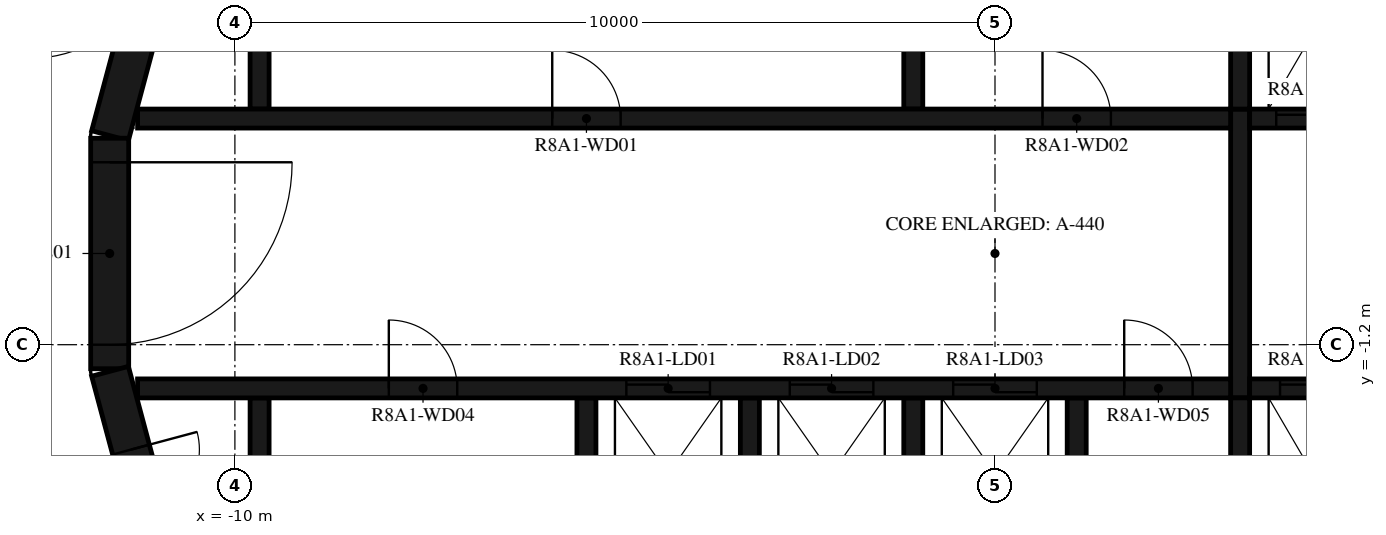
"""IFC4 building model, lengths in metres.
Left out: names, types, materials, properties, quantities, classifications, styles, units other than length and angle.
Written with IfcOpenShell. Run it as: python <this file> out.ifc"""

import sys

from ifc_helpers import new_model, si_unit, direction, frame, frame_2d, origin, place, context, subcontext, project, spatial, polyline, rectangle, outline, extrude, element, fill, save


model = new_model("IFC4")
c1 = context("Model", 3, precision=1e-05, world=origin(), true_north=direction((0.0, 1.0)))
c2 = subcontext(c1, "Body", "Model", "MODEL_VIEW")
j1 = project(units=[si_unit("LENGTHUNIT", "METRE"), si_unit("PLANEANGLEUNIT", "RADIAN")], contexts=[c1])
p1 = place(None, origin())
s1 = spatial("IfcSite", under=j1, at=p1, CompositionType="ELEMENT")
p2 = place(p1, origin())
s2 = spatial("IfcBuilding", under=s1, at=p2, CompositionType="ELEMENT")
p3 = place(p2, frame((0.0, 0.0, 301.7)))
s3 = spatial("IfcBuildingStorey", under=s2, at=p3, CompositionType="ELEMENT", Elevation=301.7)
p4 = place(p3, frame((-10.858, 4.479, 0.0), z_axis=(0.0, 0.0, 1.0), x_axis=(-0.258734743916, -0.965948410781, 0.0)))
e1 = element("IfcWall", 1, at=p4, inside=s3, PredefinedType="SHEAR", context=c2, shape_type="SweptSolid", body=[
    extrude(rectangle(XDim=3.033, YDim=0.5, at=frame_2d((1.516, 0.0))), origin(), (0.0, 0.0, 1.0), 3.12),
])
p5 = place(p3, frame((-11.647, 1.516, 0.0), z_axis=(0.0, 0.0, 1.0), x_axis=(0.0, -1.0, 0.0)))
e2 = element("IfcWall", 2, at=p5, inside=s3, PredefinedType="SHEAR", context=c2, shape_type="SweptSolid", body=[
    extrude(rectangle(XDim=3.033, YDim=0.5, at=frame_2d((1.516, 0.0))), origin(), (0.0, 0.0, 1.0), 3.12),
])
p6 = place(p5, frame((0.316, 0.0, 0.0)))
e3 = element("IfcOpeningElement", 3, at=p6, cuts=e2, PredefinedType="OPENING", context=c2, shape_type="SweptSolid", body=[
    extrude(rectangle(XDim=2.4, YDim=2.1, at=frame_2d((1.2, 1.05))), frame((0.0, 0.26, 0.0), z_axis=(0.0, -1.0, 0.0), x_axis=(1.0, 0.0, 0.0)), (0.0, 0.0, 1.0), 0.52),
])
p7 = place(p3, frame((-11.643, -1.55, 0.0), z_axis=(0.0, 0.0, 1.0), x_axis=(0.258734743916, -0.965948410781, 0.0)))
e4 = element("IfcWall", 4, at=p7, inside=s3, PredefinedType="SHEAR", context=c2, shape_type="SweptSolid", body=[
    extrude(rectangle(XDim=3.033, YDim=0.5, at=frame_2d((1.516, 0.0))), origin(), (0.0, 0.0, 1.0), 3.12),
])
p8 = place(p7, frame((1.066, 0.0, 0.0)))
e5 = element("IfcOpeningElement", 5, at=p8, cuts=e4, PredefinedType="OPENING", context=c2, shape_type="SweptSolid", body=[
    extrude(rectangle(XDim=0.9, YDim=2.1, at=frame_2d((0.45, 1.05))), frame((0.0, 0.26, 0.0), z_axis=(0.0, -1.0, 0.0), x_axis=(1.0, 0.0, 0.0)), (0.0, 0.0, 1.0), 0.52),
])
p9 = place(p3, origin())
e6 = element("IfcWall", 6, at=p9, inside=s3, PredefinedType="SHEAR", context=c2, shape_type="SweptSolid", body=[
    extrude(outline(polyline([(-9.8, 1.9), (-9.55, 1.9), (-9.55, 4.8), (-1.2, 4.8), (-1.2, 1.9), (-0.95, 1.9), (-0.95, 4.8), (3.1, 4.8), (3.1, 1.9), (3.35, 1.9), (3.35, 4.8), (5.25, 4.8), (5.25, 1.9), (5.5, 1.9), (5.5, 4.8), (7.4, 4.8), (7.4, 1.9), (7.65, 1.9), (7.65, 4.8), (9.55, 4.8), (9.55, 1.9), (9.8, 1.9), (9.8, 4.8), (9.8, 5.05), (-9.8, 5.05), (-9.8, 4.8), (-9.8, 1.9)])), origin(), (0.0, 0.0, 1.0), 3.12),
])
p10 = place(p3, origin())
e7 = element("IfcWall", 7, at=p10, inside=s3, PredefinedType="SHEAR", context=c2, shape_type="SweptSolid", body=[
    extrude(outline(polyline([(9.8, -5.05), (9.8, -4.8), (9.8, -1.9), (9.55, -1.9), (9.55, -4.8), (7.65, -4.8), (7.65, -1.9), (7.4, -1.9), (7.4, -4.8), (5.5, -4.8), (5.5, -1.9), (5.25, -1.9), (5.25, -4.8), (3.35, -4.8), (3.35, -1.9), (3.1, -1.9), (3.1, -4.8), (1.2, -4.8), (1.2, -1.9), (0.95, -1.9), (0.95, -4.8), (-0.95, -4.8), (-0.95, -1.9), (-1.2, -1.9), (-1.2, -4.8), (-3.1, -4.8), (-3.1, -1.9), (-3.35, -1.9), (-3.35, -4.8), (-5.25, -4.8), (-5.25, -1.9), (-5.5, -1.9), (-5.5, -4.8), (-9.55, -4.8), (-9.55, -1.9), (-9.8, -1.9), (-9.8, -4.8), (-9.8, -5.05), (9.8, -5.05)])), origin(), (0.0, 0.0, 1.0), 3.12),
])
p11 = place(p3, frame((-11.28, 1.775, 0.0), z_axis=(0.0, 0.0, 1.0), x_axis=(1.0, 0.0, 0.0)))
e8 = element("IfcWall", 8, at=p11, inside=s3, PredefinedType="SHEAR", context=c2, shape_type="SweptSolid", body=[
    extrude(rectangle(XDim=14.38, YDim=0.25, at=frame_2d((7.19, 0.0))), origin(), (0.0, 0.0, 1.0), 3.12),
])
p12 = place(p11, frame((5.455, 0.0, 0.0)))
e9 = element("IfcOpeningElement", 9, at=p12, cuts=e8, PredefinedType="OPENING", context=c2, shape_type="SweptSolid", body=[
    extrude(rectangle(XDim=0.9, YDim=2.1, at=frame_2d((0.45, 1.05))), frame((0.0, 0.135, 0.0), z_axis=(0.0, -1.0, 0.0), x_axis=(1.0, 0.0, 0.0)), (0.0, 0.0, 1.0), 0.27),
])
p13 = place(p11, frame((11.905, 0.0, 0.0)))
e10 = element("IfcOpeningElement", 10, at=p13, cuts=e8, PredefinedType="OPENING", context=c2, shape_type="SweptSolid", body=[
    extrude(rectangle(XDim=0.9, YDim=2.1, at=frame_2d((0.45, 1.05))), frame((0.0, 0.135, 0.0), z_axis=(0.0, -1.0, 0.0), x_axis=(1.0, 0.0, 0.0)), (0.0, 0.0, 1.0), 0.27),
])
p14 = place(p3, frame((3.35, 1.775, 0.0), z_axis=(0.0, 0.0, 1.0), x_axis=(1.0, 0.0, 0.0)))
e11 = element("IfcWall", 11, at=p14, inside=s3, PredefinedType="SHEAR", context=c2, shape_type="SweptSolid", body=[
    extrude(rectangle(XDim=7.93, YDim=0.25, at=frame_2d((3.965, 0.0))), origin(), (0.0, 0.0, 1.0), 3.12),
])
p15 = place(p14, frame((0.35, 0.0, 0.0)))
e12 = element("IfcOpeningElement", 12, at=p15, cuts=e11, PredefinedType="OPENING", context=c2, shape_type="SweptSolid", body=[
    extrude(rectangle(XDim=1.2, YDim=2.4, at=frame_2d((0.6, 1.2))), frame((0.0, 0.135, 0.0), z_axis=(0.0, -1.0, 0.0), x_axis=(1.0, 0.0, 0.0)), (0.0, 0.0, 1.0), 0.27),
])
p16 = place(p14, frame((2.5, 0.0, 0.0)))
e13 = element("IfcOpeningElement", 13, at=p16, cuts=e11, PredefinedType="OPENING", context=c2, shape_type="SweptSolid", body=[
    extrude(rectangle(XDim=1.2, YDim=2.4, at=frame_2d((0.6, 1.2))), frame((0.0, 0.135, 0.0), z_axis=(0.0, -1.0, 0.0), x_axis=(1.0, 0.0, 0.0)), (0.0, 0.0, 1.0), 0.27),
])
p17 = place(p14, frame((4.8, 0.0, 0.0)))
e14 = element("IfcOpeningElement", 14, at=p17, cuts=e11, PredefinedType="OPENING", context=c2, shape_type="SweptSolid", body=[
    extrude(rectangle(XDim=0.9, YDim=2.1, at=frame_2d((0.45, 1.05))), frame((0.0, 0.135, 0.0), z_axis=(0.0, -1.0, 0.0), x_axis=(1.0, 0.0, 0.0)), (0.0, 0.0, 1.0), 0.27),
])
p18 = place(p3, frame((-11.28, -1.775, 0.0), z_axis=(0.0, 0.0, 1.0), x_axis=(1.0, 0.0, 0.0)))
e15 = element("IfcWall", 15, at=p18, inside=s3, PredefinedType="SHEAR", context=c2, shape_type="SweptSolid", body=[
    extrude(rectangle(XDim=14.38, YDim=0.25, at=frame_2d((7.19, 0.0))), origin(), (0.0, 0.0, 1.0), 3.12),
])
p19 = place(p18, frame((6.43, 0.0, 0.0)))
e16 = element("IfcOpeningElement", 16, at=p19, cuts=e15, PredefinedType="OPENING", context=c2, shape_type="SweptSolid", body=[
    extrude(rectangle(XDim=1.1, YDim=2.1, at=frame_2d((0.55, 1.05))), frame((0.0, 0.135, 0.0), z_axis=(0.0, -1.0, 0.0), x_axis=(1.0, 0.0, 0.0)), (0.0, 0.0, 1.0), 0.27),
])
p20 = place(p18, frame((8.58, 0.0, 0.0)))
e17 = element("IfcOpeningElement", 17, at=p20, cuts=e15, PredefinedType="OPENING", context=c2, shape_type="SweptSolid", body=[
    extrude(rectangle(XDim=1.1, YDim=2.1, at=frame_2d((0.55, 1.05))), frame((0.0, 0.135, 0.0), z_axis=(0.0, -1.0, 0.0), x_axis=(1.0, 0.0, 0.0)), (0.0, 0.0, 1.0), 0.27),
])
p21 = place(p18, frame((10.73, 0.0, 0.0)))
e18 = element("IfcOpeningElement", 18, at=p21, cuts=e15, PredefinedType="OPENING", context=c2, shape_type="SweptSolid", body=[
    extrude(rectangle(XDim=1.1, YDim=2.1, at=frame_2d((0.55, 1.05))), frame((0.0, 0.135, 0.0), z_axis=(0.0, -1.0, 0.0), x_axis=(1.0, 0.0, 0.0)), (0.0, 0.0, 1.0), 0.27),
])
p22 = place(p18, frame((3.305, 0.0, 0.0)))
e19 = element("IfcOpeningElement", 19, at=p22, cuts=e15, PredefinedType="OPENING", context=c2, shape_type="SweptSolid", body=[
    extrude(rectangle(XDim=0.9, YDim=2.1, at=frame_2d((0.45, 1.05))), frame((0.0, 0.135, 0.0), z_axis=(0.0, -1.0, 0.0), x_axis=(1.0, 0.0, 0.0)), (0.0, 0.0, 1.0), 0.27),
])
p23 = place(p18, frame((12.98, 0.0, 0.0)))
e20 = element("IfcOpeningElement", 20, at=p23, cuts=e15, PredefinedType="OPENING", context=c2, shape_type="SweptSolid", body=[
    extrude(rectangle(XDim=0.9, YDim=2.1, at=frame_2d((0.45, 1.05))), frame((0.0, 0.135, 0.0), z_axis=(0.0, -1.0, 0.0), x_axis=(1.0, 0.0, 0.0)), (0.0, 0.0, 1.0), 0.27),
])
p24 = place(p3, frame((3.35, -1.775, 0.0), z_axis=(0.0, 0.0, 1.0), x_axis=(1.0, 0.0, 0.0)))
e21 = element("IfcWall", 21, at=p24, inside=s3, PredefinedType="SHEAR", context=c2, shape_type="SweptSolid", body=[
    extrude(rectangle(XDim=7.93, YDim=0.25, at=frame_2d((3.965, 0.0))), origin(), (0.0, 0.0, 1.0), 3.12),
])
p25 = place(p24, frame((0.4, 0.0, 0.0)))
e22 = element("IfcOpeningElement", 22, at=p25, cuts=e21, PredefinedType="OPENING", context=c2, shape_type="SweptSolid", body=[
    extrude(rectangle(XDim=1.1, YDim=2.4, at=frame_2d((0.55, 1.2))), frame((0.0, 0.135, 0.0), z_axis=(0.0, -1.0, 0.0), x_axis=(1.0, 0.0, 0.0)), (0.0, 0.0, 1.0), 0.27),
])
p26 = place(p24, frame((2.55, 0.0, 0.0)))
e23 = element("IfcOpeningElement", 23, at=p26, cuts=e21, PredefinedType="OPENING", context=c2, shape_type="SweptSolid", body=[
    extrude(rectangle(XDim=1.1, YDim=2.4, at=frame_2d((0.55, 1.2))), frame((0.0, 0.135, 0.0), z_axis=(0.0, -1.0, 0.0), x_axis=(1.0, 0.0, 0.0)), (0.0, 0.0, 1.0), 0.27),
])
p27 = place(p24, frame((4.7, 0.0, 0.0)))
e24 = element("IfcOpeningElement", 24, at=p27, cuts=e21, PredefinedType="OPENING", context=c2, shape_type="SweptSolid", body=[
    extrude(rectangle(XDim=1.1, YDim=2.4, at=frame_2d((0.55, 1.2))), frame((0.0, 0.135, 0.0), z_axis=(0.0, -1.0, 0.0), x_axis=(1.0, 0.0, 0.0)), (0.0, 0.0, 1.0), 0.27),
])
p28 = place(p3, frame((3.225, -1.9, 0.0), z_axis=(0.0, 0.0, 1.0), x_axis=(0.0, 1.0, 0.0)))
e25 = element("IfcWall", 25, at=p28, inside=s3, PredefinedType="SHEAR", context=c2, shape_type="SweptSolid", body=[
    extrude(rectangle(XDim=3.8, YDim=0.25, at=frame_2d((1.9, 0.0))), origin(), (0.0, 0.0, 1.0), 3.12),
])
p29 = place(p3, frame((-12.074, 6.831, 0.0), z_axis=(0.0, 0.0, 1.0), x_axis=(-0.250391063186, -0.968144780225, 0.0)))
e26 = element("IfcWall", 26, at=p29, inside=s3, PredefinedType="STANDARD", context=c2, shape_type="SweptSolid", body=[
    extrude(rectangle(XDim=7.181, YDim=0.2, at=frame_2d((3.591, 0.0))), origin(), (0.0, 0.0, 1.0), 3.12),
])
p30 = place(p29, frame((2.548, 0.0, 0.0)))
e27 = element("IfcOpeningElement", 27, at=p30, cuts=e26, PredefinedType="OPENING", context=c2, shape_type="SweptSolid", body=[
    extrude(rectangle(XDim=1.8, YDim=2.1, at=frame_2d((0.9, 1.05))), frame((0.0, 0.11, 0.0), z_axis=(0.0, -1.0, 0.0), x_axis=(1.0, 0.0, 0.0)), (0.0, 0.0, 1.0), 0.22),
])
p31 = place(p3, frame((-13.872, -0.121, 0.0), z_axis=(0.0, 0.0, 1.0), x_axis=(0.267254575108, -0.963625960674, 0.0)))
e28 = element("IfcWall", 28, at=p31, inside=s3, PredefinedType="STANDARD", context=c2, shape_type="SweptSolid", body=[
    extrude(rectangle(XDim=7.181, YDim=0.2, at=frame_2d((3.591, 0.0))), origin(), (0.0, 0.0, 1.0), 3.12),
])
p32 = place(p6, origin())
e29 = element("IfcDoor", 29, at=p32, inside=s3, OperationType="DOUBLE_DOOR_SINGLE_SWING", PredefinedType="DOOR", context=c2, shape_type="SweptSolid", body=[
    extrude(rectangle(XDim=2.4, YDim=2.1, at=frame_2d((1.2, 1.05))), frame((0.0, 0.025, 0.0), z_axis=(0.0, -1.0, 0.0), x_axis=(1.0, 0.0, 0.0)), (0.0, 0.0, 1.0), 0.05),
])
fill(e3, e29)
p33 = place(p15, origin())
e30 = element("IfcDoor", 30, at=p33, inside=s3, OperationType="DOUBLE_DOOR_SLIDING", PredefinedType="DOOR", context=c2, shape_type="SweptSolid", body=[
    extrude(rectangle(XDim=1.2, YDim=2.4, at=frame_2d((0.6, 1.2))), frame((0.0, 0.025, 0.0), z_axis=(0.0, -1.0, 0.0), x_axis=(1.0, 0.0, 0.0)), (0.0, 0.0, 1.0), 0.05),
])
fill(e12, e30)
p34 = place(p19, origin())
e31 = element("IfcDoor", 31, at=p34, inside=s3, OperationType="DOUBLE_DOOR_SLIDING", PredefinedType="DOOR", context=c2, shape_type="SweptSolid", body=[
    extrude(rectangle(XDim=1.1, YDim=2.1, at=frame_2d((0.55, 1.05))), frame((0.0, 0.025, 0.0), z_axis=(0.0, -1.0, 0.0), x_axis=(1.0, 0.0, 0.0)), (0.0, 0.0, 1.0), 0.05),
])
fill(e16, e31)
p35 = place(p20, origin())
e32 = element("IfcDoor", 32, at=p35, inside=s3, OperationType="DOUBLE_DOOR_SLIDING", PredefinedType="DOOR", context=c2, shape_type="SweptSolid", body=[
    extrude(rectangle(XDim=1.1, YDim=2.1, at=frame_2d((0.55, 1.05))), frame((0.0, 0.025, 0.0), z_axis=(0.0, -1.0, 0.0), x_axis=(1.0, 0.0, 0.0)), (0.0, 0.0, 1.0), 0.05),
])
fill(e17, e32)
p36 = place(p21, origin())
e33 = element("IfcDoor", 33, at=p36, inside=s3, OperationType="DOUBLE_DOOR_SLIDING", PredefinedType="DOOR", context=c2, shape_type="SweptSolid", body=[
    extrude(rectangle(XDim=1.1, YDim=2.1, at=frame_2d((0.55, 1.05))), frame((0.0, 0.025, 0.0), z_axis=(0.0, -1.0, 0.0), x_axis=(1.0, 0.0, 0.0)), (0.0, 0.0, 1.0), 0.05),
])
fill(e18, e33)
p37 = place(p25, origin())
e34 = element("IfcDoor", 34, at=p37, inside=s3, OperationType="DOUBLE_DOOR_SLIDING", PredefinedType="DOOR", context=c2, shape_type="SweptSolid", body=[
    extrude(rectangle(XDim=1.1, YDim=2.4, at=frame_2d((0.55, 1.2))), frame((0.0, 0.025, 0.0), z_axis=(0.0, -1.0, 0.0), x_axis=(1.0, 0.0, 0.0)), (0.0, 0.0, 1.0), 0.05),
])
fill(e22, e34)
p38 = place(p12, origin())
e35 = element("IfcDoor", 35, at=p38, inside=s3, OperationType="SINGLE_SWING_LEFT", PredefinedType="DOOR", context=c2, shape_type="SweptSolid", body=[
    extrude(rectangle(XDim=0.9, YDim=2.1, at=frame_2d((0.45, 1.05))), frame((0.0, 0.025, 0.0), z_axis=(0.0, -1.0, 0.0), x_axis=(1.0, 0.0, 0.0)), (0.0, 0.0, 1.0), 0.05),
])
fill(e9, e35)
p39 = place(p13, origin())
e36 = element("IfcDoor", 36, at=p39, inside=s3, OperationType="SINGLE_SWING_RIGHT", PredefinedType="DOOR", context=c2, shape_type="SweptSolid", body=[
    extrude(rectangle(XDim=0.9, YDim=2.1, at=frame_2d((0.45, 1.05))), frame((0.0, 0.025, 0.0), z_axis=(0.0, -1.0, 0.0), x_axis=(1.0, 0.0, 0.0)), (0.0, 0.0, 1.0), 0.05),
])
fill(e10, e36)
p40 = place(p22, origin())
e37 = element("IfcDoor", 37, at=p40, inside=s3, OperationType="SINGLE_SWING_RIGHT", PredefinedType="DOOR", context=c2, shape_type="SweptSolid", body=[
    extrude(rectangle(XDim=0.9, YDim=2.1, at=frame_2d((0.45, 1.05))), frame((0.0, 0.025, 0.0), z_axis=(0.0, -1.0, 0.0), x_axis=(1.0, 0.0, 0.0)), (0.0, 0.0, 1.0), 0.05),
])
fill(e19, e37)
p41 = place(p23, origin())
e38 = element("IfcDoor", 38, at=p41, inside=s3, OperationType="SINGLE_SWING_LEFT", PredefinedType="DOOR", context=c2, shape_type="SweptSolid", body=[
    extrude(rectangle(XDim=0.9, YDim=2.1, at=frame_2d((0.45, 1.05))), frame((0.0, 0.025, 0.0), z_axis=(0.0, -1.0, 0.0), x_axis=(1.0, 0.0, 0.0)), (0.0, 0.0, 1.0), 0.05),
])
fill(e20, e38)
p42 = place(p8, origin())
e39 = element("IfcDoor", 39, at=p42, inside=s3, OperationType="SINGLE_SWING_RIGHT", PredefinedType="DOOR", context=c2, shape_type="SweptSolid", body=[
    extrude(rectangle(XDim=0.9, YDim=2.1, at=frame_2d((0.45, 1.05))), frame((0.0, 0.025, 0.0), z_axis=(0.0, -1.0, 0.0), x_axis=(1.0, 0.0, 0.0)), (0.0, 0.0, 1.0), 0.05),
])
fill(e5, e39)
save(model, sys.argv[1])
